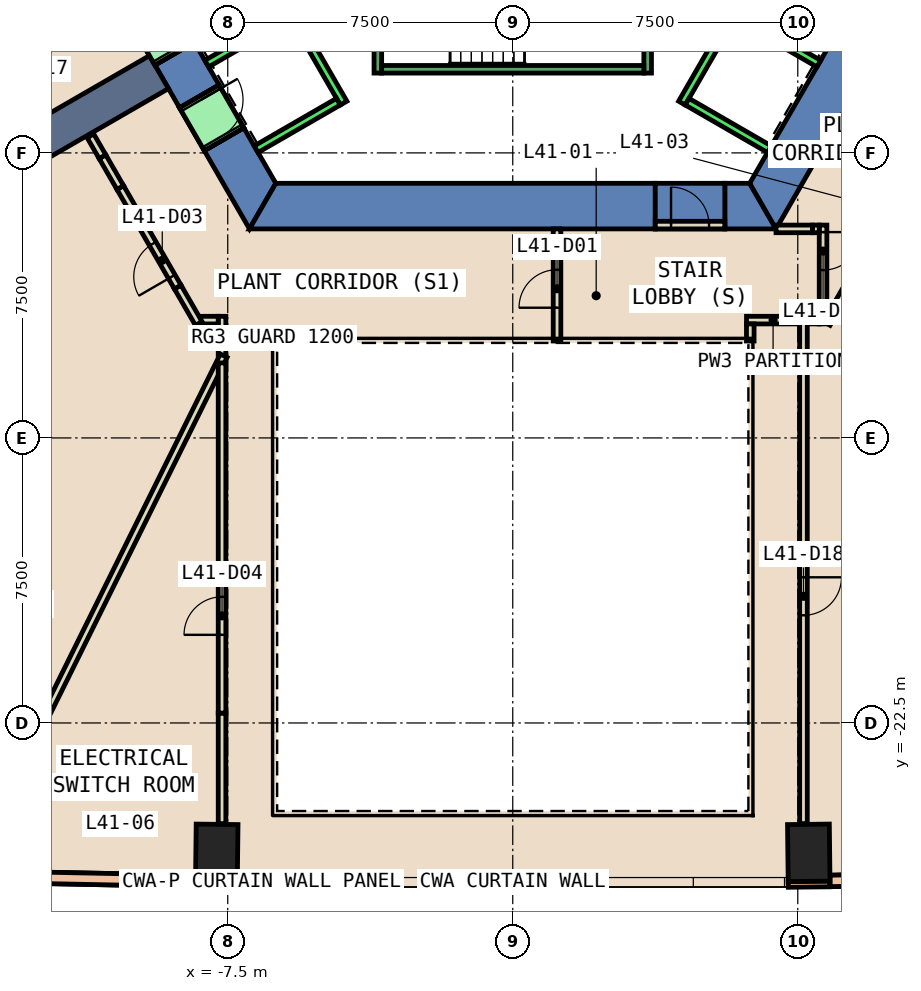
"""IFC4 building model, lengths in metres.
Left out: names, types, materials, properties, quantities, classifications, styles, units other than length and angle.
Written with IfcOpenShell. Run it as: python <this file> out.ifc"""

import sys

from ifc_helpers import new_model, si_unit, direction, frame, frame_2d, origin, origin_2d, place, context, subcontext, project, spatial, polyline, rectangle, outline, extrude, element, fill, save


model = new_model("IFC4")
c1 = context("Model", 3, precision=1e-05, world=origin(), true_north=direction((0.0, 1.0)))
c2 = subcontext(c1, "Body", "Model", "MODEL_VIEW")
j1 = project(units=[si_unit("LENGTHUNIT", "METRE"), si_unit("PLANEANGLEUNIT", "RADIAN")], contexts=[c1])
p1 = place(None, origin())
s1 = spatial("IfcSite", under=j1, at=p1, CompositionType="ELEMENT")
p2 = place(p1, origin())
s2 = spatial("IfcBuilding", under=s1, at=p2, CompositionType="ELEMENT")
p3 = place(p2, frame((0.0, 0.0, 184.4)))
s3 = spatial("IfcBuildingStorey", under=s2, at=p3, CompositionType="ELEMENT", Elevation=184.4)
for number, where, z_axis, x_axis in (
    (1, (-7.789, -25.917, -0.6), (0.0, 0.0, 1.0), (-1.0, 0.012, 0.0)),
    (2, (7.789, -25.917, -0.6), (0.0, 0.0, 1.0), (1.0, 0.012, 0.0)),
):
    element("IfcColumn", number, at=place(p3, frame(where, z_axis=z_axis, x_axis=x_axis)), inside=s3, PredefinedType="COLUMN", context=c2, shape_type="SweptSolid", body=[
        extrude(rectangle(XDim=1.1, YDim=1.5, at=origin_2d()), origin(), (0.0, 0.0, 1.0), 5.4),
    ])
p4 = place(p3, frame((0.0, 0.0, -0.6)))
e3 = element("IfcWall", 3, at=p4, inside=s3, PredefinedType="SHEAR", context=c2, shape_type="SweptSolid", body=[
    extrude(outline(polyline([(-8.767, -6.314), (-7.728, -5.714), (-8.378, -4.589), (-9.417, -5.189), (-8.767, -6.314)])), origin(), (0.0, 0.0, 1.0), 5.4),
])
p5 = place(p3, frame((0.0, 0.0, -0.6)))
e4 = element("IfcWall", 4, at=p5, inside=s3, PredefinedType="SHEAR", context=c2, shape_type="SweptSolid", body=[
    extrude(outline(polyline([(-7.078, -6.84), (-8.117, -7.44), (-6.928, -9.5), (-6.235, -8.3), (-7.078, -6.84)])), origin(), (0.0, 0.0, 1.0), 5.4),
])
p6 = place(p3, frame((0.0, 0.0, 3.6)))
e5 = element("IfcWall", 5, at=p6, inside=s3, PredefinedType="SHEAR", context=c2, shape_type="SweptSolid", body=[
    extrude(outline(polyline([(-9.417, -5.189), (-8.378, -4.589), (-9.028, -3.463), (-10.067, -4.063), (-9.417, -5.189)])), origin(), (0.0, 0.0, 1.0), 1.2),
])
p7 = place(p3, frame((0.0, 0.0, 3.6)))
e6 = element("IfcWall", 6, at=p7, inside=s3, PredefinedType="SHEAR", context=c2, shape_type="SweptSolid", body=[
    extrude(outline(polyline([(-8.117, -7.44), (-7.078, -6.84), (-7.728, -5.714), (-8.767, -6.314), (-8.117, -7.44)])), origin(), (0.0, 0.0, 1.0), 1.2),
])
p8 = place(p3, frame((0.0, 0.0, -0.6)))
e7 = element("IfcWall", 7, at=p8, inside=s3, PredefinedType="SHEAR", context=c2, shape_type="SweptSolid", body=[
    extrude(outline(polyline([(3.75, -9.5), (3.75, -8.3), (-6.235, -8.3), (-6.928, -9.5), (3.75, -9.5)])), origin(), (0.0, 0.0, 1.0), 5.4),
])
p9 = place(p3, frame((0.0, 0.0, -0.6)))
e8 = element("IfcWall", 8, at=p9, inside=s3, PredefinedType="SHEAR", context=c2, shape_type="SweptSolid", body=[
    extrude(outline(polyline([(5.58, -8.3), (5.58, -9.5), (6.928, -9.5), (6.235, -8.3), (5.58, -8.3)])), origin(), (0.0, 0.0, 1.0), 5.4),
])
p10 = place(p3, frame((0.0, 0.0, 3.6)))
e9 = element("IfcWall", 9, at=p10, inside=s3, PredefinedType="SHEAR", context=c2, shape_type="SweptSolid", body=[
    extrude(outline(polyline([(5.58, -9.5), (5.58, -8.3), (3.75, -8.3), (3.75, -9.5), (5.58, -9.5)])), origin(), (0.0, 0.0, 1.0), 1.2),
])
p11 = place(p3, frame((0.0, 0.0, -0.6)))
e10 = element("IfcWall", 10, at=p11, inside=s3, PredefinedType="SHEAR", context=c2, shape_type="SweptSolid", body=[
    extrude(outline(polyline([(6.928, -9.5), (13.856, 2.5), (12.471, 2.5), (6.235, -8.3), (6.928, -9.5)])), origin(), (0.0, 0.0, 1.0), 5.4),
])
p12 = place(p3, frame((-9.31, -5.375, 0.0), z_axis=(0.0, 0.0, 1.0), x_axis=(-0.866015103238, -0.500017840646, 0.0)))
e11 = element("IfcWall", 11, at=p12, inside=s3, PredefinedType="SHEAR", context=c2, shape_type="SweptSolid", body=[
    extrude(rectangle(XDim=27.139, YDim=1.0, at=frame_2d((13.57, 0.0))), origin(), (0.0, 0.0, 1.0), 4.8),
])
for number, where, z_axis, x_axis in (
    (12, (-8.349, -26.736, 0.0), (0.0, 0.0, 1.0), (1.0, -0.011, 0.0)),
    (13, (7.249, -26.748, 0.0), (0.0, 0.0, 1.0), (1.0, 0.011, 0.0)),
):
    element("IfcWall", number, at=place(p3, frame(where, z_axis=z_axis, x_axis=x_axis)), inside=s3, PredefinedType="STANDARD", context=c2, shape_type="SweptSolid", body=[
        extrude(rectangle(XDim=1.1, YDim=0.15, at=frame_2d((0.55, 0.0))), origin(), (0.0, 0.0, 1.0), 4.8),
    ])
p13 = place(p3, frame((-15.68, -26.508, 0.0), z_axis=(0.0, 0.0, 1.0), x_axis=(0.999796530884, -0.020171683903, 0.0)))
e14 = element("IfcWall", 14, at=p13, inside=s3, PredefinedType="STANDARD", context=c2, shape_type="SweptSolid", body=[
    extrude(rectangle(XDim=7.334, YDim=0.3, at=frame_2d((3.667, 0.0))), origin(), (0.0, 0.0, 1.0), 1.2),
])
p14 = place(p3, frame((-15.68, -26.508, 4.0), z_axis=(0.0, 0.0, 1.0), x_axis=(0.999796530884, -0.020171683903, 0.0)))
e15 = element("IfcWall", 15, at=p14, inside=s3, PredefinedType="STANDARD", context=c2, shape_type="SweptSolid", body=[
    extrude(rectangle(XDim=7.334, YDim=0.3, at=frame_2d((3.667, 0.0))), origin(), (0.0, 0.0, 1.0), 0.8),
])
p15 = place(p3, frame((8.347, -26.656, 0.0), z_axis=(0.0, 0.0, 1.0), x_axis=(0.999796530884, 0.020171683903, 0.0)))
e16 = element("IfcWall", 16, at=p15, inside=s3, PredefinedType="STANDARD", context=c2, shape_type="SweptSolid", body=[
    extrude(rectangle(XDim=7.334, YDim=0.3, at=frame_2d((3.667, 0.0))), origin(), (0.0, 0.0, 1.0), 1.2),
])
p16 = place(p3, frame((8.347, -26.656, 4.0), z_axis=(0.0, 0.0, 1.0), x_axis=(0.999796530884, 0.020171683903, 0.0)))
e17 = element("IfcWall", 17, at=p16, inside=s3, PredefinedType="STANDARD", context=c2, shape_type="SweptSolid", body=[
    extrude(rectangle(XDim=7.334, YDim=0.3, at=frame_2d((3.667, 0.0))), origin(), (0.0, 0.0, 1.0), 0.8),
])
p17 = place(p3, frame((1.165, -12.45, 0.0), z_axis=(0.0, 0.0, 1.0), x_axis=(0.0, 1.0, 0.0)))
e18 = element("IfcWall", 18, at=p17, inside=s3, PredefinedType="PARTITIONING", context=c2, shape_type="SweptSolid", body=[
    extrude(rectangle(XDim=2.95, YDim=0.2, at=frame_2d((1.475, 0.0))), origin(), (0.0, 0.0, 1.0), 4.8),
])
p18 = place(p17, frame((0.876, 0.0, 0.0)))
e19 = element("IfcOpeningElement", 19, at=p18, cuts=e18, PredefinedType="OPENING", context=c2, shape_type="SweptSolid", body=[
    extrude(rectangle(XDim=1.0, YDim=2.1, at=frame_2d((0.5, 1.05))), frame((0.0, 0.11, 0.0), z_axis=(0.0, -1.0, 0.0), x_axis=(1.0, 0.0, 0.0)), (0.0, 0.0, 1.0), 0.22),
])
p19 = place(p3, frame((7.55, -11.9, 0.0), z_axis=(0.0, 0.0, 1.0), x_axis=(-1.0, 0.0, 0.0)))
e20 = element("IfcWall", 20, at=p19, inside=s3, PredefinedType="PARTITIONING", context=c2, shape_type="SweptSolid", body=[
    extrude(rectangle(XDim=1.399, YDim=0.2, at=frame_2d((0.7, 0.0))), origin(), (0.0, 0.0, 1.0), 4.8),
])
p20 = place(p3, frame((6.25, -12.0, 0.0), z_axis=(0.0, 0.0, 1.0), x_axis=(0.0, -1.0, 0.0)))
e21 = element("IfcWall", 21, at=p20, inside=s3, PredefinedType="PARTITIONING", context=c2, shape_type="SweptSolid", body=[
    extrude(rectangle(XDim=0.45, YDim=0.2, at=frame_2d((0.225, 0.0))), origin(), (0.0, 0.0, 1.0), 4.8),
])
p21 = place(p3, frame((6.928, -9.5, 0.0), z_axis=(0.0, 0.0, 1.0), x_axis=(1.0, 0.0, 0.0)))
e22 = element("IfcWall", 22, at=p21, inside=s3, PredefinedType="PARTITIONING", context=c2, shape_type="SweptSolid", body=[
    extrude(rectangle(XDim=0.962, YDim=0.2, at=frame_2d((0.481, 0.0))), origin(), (0.0, 0.0, 1.0), 2.4),
])
p22 = place(p3, frame((8.165, -9.4, 0.0), z_axis=(0.0, 0.0, 1.0), x_axis=(0.0, -1.0, 0.0)))
e23 = element("IfcWall", 23, at=p22, inside=s3, PredefinedType="PARTITIONING", context=c2, shape_type="SweptSolid", body=[
    extrude(rectangle(XDim=2.6, YDim=0.2, at=frame_2d((1.3, 0.0))), origin(), (0.0, 0.0, 1.0), 4.8),
])
p23 = place(p22, frame((0.184, 0.0, 0.0)))
e24 = element("IfcOpeningElement", 24, at=p23, cuts=e23, PredefinedType="OPENING", context=c2, shape_type="SweptSolid", body=[
    extrude(rectangle(XDim=1.0, YDim=2.1, at=frame_2d((0.5, 1.05))), frame((0.0, 0.11, 0.0), z_axis=(0.0, -1.0, 0.0), x_axis=(1.0, 0.0, 0.0)), (0.0, 0.0, 1.0), 0.22),
])
p24 = place(p3, frame((8.065, -11.9, 0.0), z_axis=(0.0, 0.0, 1.0), x_axis=(-1.0, 0.0, 0.0)))
e25 = element("IfcWall", 25, at=p24, inside=s3, PredefinedType="PARTITIONING", context=c2, shape_type="SweptSolid", body=[
    extrude(rectangle(XDim=0.315, YDim=0.2, at=frame_2d((0.157, 0.0))), origin(), (0.0, 0.0, 1.0), 4.8),
])
p25 = place(p3, frame((7.65, -11.8, 0.0), z_axis=(0.0, 0.0, 1.0), x_axis=(0.0, -1.0, 0.0)))
e26 = element("IfcWall", 26, at=p25, inside=s3, PredefinedType="PARTITIONING", context=c2, shape_type="SweptSolid", body=[
    extrude(rectangle(XDim=13.349, YDim=0.2, at=frame_2d((6.674, 0.0))), origin(), (0.0, 0.0, 1.0), 4.8),
])
p26 = place(p25, frame((6.867, 0.0, 0.0)))
e27 = element("IfcOpeningElement", 27, at=p26, cuts=e26, PredefinedType="OPENING", context=c2, shape_type="SweptSolid", body=[
    extrude(rectangle(XDim=1.0, YDim=2.1, at=frame_2d((0.5, 1.05))), frame((0.0, 0.11, 0.0), z_axis=(0.0, -1.0, 0.0), x_axis=(1.0, 0.0, 0.0)), (0.0, 0.0, 1.0), 0.22),
])
p27 = place(p3, frame((-7.65, -12.826, 0.0), z_axis=(0.0, 0.0, 1.0), x_axis=(0.0, 1.0, 0.0)))
e28 = element("IfcWall", 28, at=p27, inside=s3, PredefinedType="PARTITIONING", context=c2, shape_type="SweptSolid", body=[
    extrude(rectangle(XDim=1.026, YDim=0.2, at=frame_2d((0.513, 0.0))), origin(), (0.0, 0.0, 1.0), 4.8),
])
p28 = place(p3, frame((-7.75, -11.9, 0.0), z_axis=(0.0, 0.0, 1.0), x_axis=(-1.0, 0.0, 0.0)))
e29 = element("IfcWall", 29, at=p28, inside=s3, PredefinedType="PARTITIONING", context=c2, shape_type="SweptSolid", body=[
    extrude(rectangle(XDim=0.464, YDim=0.2, at=frame_2d((0.232, 0.0))), origin(), (0.0, 0.0, 1.0), 2.4),
])
p29 = place(p3, frame((-8.264, -11.987, 0.0), z_axis=(0.0, 0.0, 1.0), x_axis=(-0.499633176362, 0.866237085952, 0.0)))
e30 = element("IfcWall", 30, at=p29, inside=s3, PredefinedType="PARTITIONING", context=c2, shape_type="SweptSolid", body=[
    extrude(rectangle(XDim=1.105, YDim=0.2, at=frame_2d((0.552, 0.0))), origin(), (0.0, 0.0, 1.0), 2.4),
])
p30 = place(p3, frame((-7.65, -25.149, 0.0), z_axis=(0.0, 0.0, 1.0), x_axis=(0.0, 1.0, 0.0)))
e31 = element("IfcWall", 31, at=p30, inside=s3, PredefinedType="PARTITIONING", context=c2, shape_type="SweptSolid", body=[
    extrude(rectangle(XDim=2.909, YDim=0.2, at=frame_2d((1.455, 0.0))), origin(), (0.0, 0.0, 1.0), 4.8),
])
p31 = place(p3, frame((-7.606, -12.836, 0.0), z_axis=(0.0, 0.0, 1.0), x_axis=(-0.444256696047, -0.895899541253, 0.0)))
e32 = element("IfcWall", 32, at=p31, inside=s3, PredefinedType="PARTITIONING", context=c2, shape_type="SweptSolid", body=[
    extrude(rectangle(XDim=13.916, YDim=0.2, at=frame_2d((6.958, 0.0))), origin(), (0.0, 0.0, 1.0), 4.8),
])
p32 = place(p3, frame((-35.502, -17.996, 0.0), z_axis=(0.0, 0.0, 1.0), x_axis=(0.866041720547, 0.499971737474, 0.0)))
e33 = element("IfcWall", 33, at=p32, inside=s3, PredefinedType="PARTITIONING", context=c2, shape_type="SweptSolid", body=[
    extrude(rectangle(XDim=28.994, YDim=0.2, at=frame_2d((14.497, 0.0))), origin(), (0.0, 0.0, 1.0), 4.8),
])
p33 = place(p3, frame((3.75, -9.4, 0.0), z_axis=(0.0, 0.0, 1.0), x_axis=(1.0, 0.0, 0.0)))
e34 = element("IfcWall", 34, at=p33, inside=s3, PredefinedType="PARTITIONING", context=c2, shape_type="SweptSolid", body=[
    extrude(rectangle(XDim=1.83, YDim=0.2, at=frame_2d((0.915, 0.0))), origin(), (0.0, 0.0, 1.0), 2.4),
])
p34 = place(p33, frame((0.415, 0.0, 0.0)))
e35 = element("IfcOpeningElement", 35, at=p34, cuts=e34, PredefinedType="OPENING", context=c2, shape_type="SweptSolid", body=[
    extrude(rectangle(XDim=1.0, YDim=2.1, at=frame_2d((0.5, 1.05))), frame((0.0, 0.11, 0.0), z_axis=(0.0, -1.0, 0.0), x_axis=(1.0, 0.0, 0.0)), (0.0, 0.0, 1.0), 0.22),
])
p35 = place(p3, frame((7.89, -9.5, 0.0), z_axis=(0.0, 0.0, 1.0), x_axis=(1.0, 0.0, 0.0)))
e36 = element("IfcWall", 36, at=p35, inside=s3, PredefinedType="PARTITIONING", context=c2, shape_type="SweptSolid", body=[
    extrude(rectangle(XDim=0.175, YDim=0.2, at=frame_2d((0.087, 0.0))), origin(), (0.0, 0.0, 1.0), 4.8),
])
p36 = place(p3, frame((-8.816, -11.03, 0.0), z_axis=(0.0, 0.0, 1.0), x_axis=(-0.50004869401, 0.865997288459, 0.0)))
e37 = element("IfcWall", 37, at=p36, inside=s3, PredefinedType="PARTITIONING", context=c2, shape_type="SweptSolid", body=[
    extrude(rectangle(XDim=2.008, YDim=0.2, at=frame_2d((1.004, 0.0))), origin(), (0.0, 0.0, 1.0), 4.8),
])
p37 = place(p36, frame((0.314, 0.0, 0.0)))
e38 = element("IfcOpeningElement", 38, at=p37, cuts=e37, PredefinedType="OPENING", context=c2, shape_type="SweptSolid", body=[
    extrude(rectangle(XDim=1.0, YDim=2.1, at=frame_2d((0.5, 1.05))), frame((0.0, 0.11, 0.0), z_axis=(0.0, -1.0, 0.0), x_axis=(1.0, 0.0, 0.0)), (0.0, 0.0, 1.0), 0.22),
])
p38 = place(p3, frame((-9.82, -9.291, 0.0), z_axis=(0.0, 0.0, 1.0), x_axis=(-0.500277597875, 0.865865073245, 0.0)))
e39 = element("IfcWall", 39, at=p38, inside=s3, PredefinedType="PARTITIONING", context=c2, shape_type="SweptSolid", body=[
    extrude(rectangle(XDim=1.015, YDim=0.2, at=frame_2d((0.508, 0.0))), origin(), (0.0, 0.0, 1.0), 2.4),
])
p39 = place(p3, frame((-10.328, -8.412, 0.0), z_axis=(0.0, 0.0, 1.0), x_axis=(-0.4998875608, 0.866090310855, 0.0)))
e40 = element("IfcWall", 40, at=p39, inside=s3, PredefinedType="PARTITIONING", context=c2, shape_type="SweptSolid", body=[
    extrude(rectangle(XDim=0.939, YDim=0.2, at=frame_2d((0.469, 0.0))), origin(), (0.0, 0.0, 1.0), 4.8),
])
p40 = place(p3, frame((-10.797, -7.599, 0.0), z_axis=(0.0, 0.0, 1.0), x_axis=(-0.499377186864, 0.866384686638, 0.0)))
e41 = element("IfcWall", 41, at=p40, inside=s3, PredefinedType="PARTITIONING", context=c2, shape_type="SweptSolid", body=[
    extrude(rectangle(XDim=0.633, YDim=0.2, at=frame_2d((0.316, 0.0))), origin(), (0.0, 0.0, 1.0), 2.4),
])
p41 = place(p3, frame((-7.65, -22.24, 0.0), z_axis=(0.0, 0.0, 1.0), x_axis=(0.0, 1.0, 0.0)))
e42 = element("IfcWall", 42, at=p41, inside=s3, PredefinedType="PARTITIONING", context=c2, shape_type="SweptSolid", body=[
    extrude(rectangle(XDim=3.455, YDim=0.2, at=frame_2d((1.728, 0.0))), origin(), (0.0, 0.0, 1.0), 2.4),
])
p42 = place(p41, frame((2.059, 0.0, 0.0)))
e43 = element("IfcOpeningElement", 43, at=p42, cuts=e42, PredefinedType="OPENING", context=c2, shape_type="SweptSolid", body=[
    extrude(rectangle(XDim=1.0, YDim=2.1, at=frame_2d((0.5, 1.05))), frame((0.0, 0.11, 0.0), z_axis=(0.0, -1.0, 0.0), x_axis=(1.0, 0.0, 0.0)), (0.0, 0.0, 1.0), 0.22),
])
p43 = place(p3, frame((-7.65, -18.785, 0.0), z_axis=(0.0, 0.0, 1.0), x_axis=(0.0, 1.0, 0.0)))
e44 = element("IfcWall", 44, at=p43, inside=s3, PredefinedType="PARTITIONING", context=c2, shape_type="SweptSolid", body=[
    extrude(rectangle(XDim=5.759, YDim=0.2, at=frame_2d((2.879, 0.0))), origin(), (0.0, 0.0, 1.0), 4.8),
])
p44 = place(p3, frame((8.816, -11.03, 0.0), z_axis=(0.0, 0.0, 1.0), x_axis=(-0.499633176362, -0.866237085952, 0.0)))
e45 = element("IfcWall", 45, at=p44, inside=s3, PredefinedType="PARTITIONING", context=c2, shape_type="SweptSolid", body=[
    extrude(rectangle(XDim=1.105, YDim=0.2, at=frame_2d((0.552, 0.0))), origin(), (0.0, 0.0, 1.0), 2.4),
])
p45 = place(p3, frame((-9.751, 2.99, 0.0), z_axis=(0.0, 0.0, 1.0), x_axis=(0.50000090737, -0.866024879913, 0.0)))
e46 = element("IfcWall", 46, at=p45, inside=s3, PredefinedType="STANDARD", context=c2, shape_type="SweptSolid", body=[
    extrude(rectangle(XDim=10.6, YDim=0.2, at=frame_2d((5.3, 0.0))), origin(), (0.0, 0.0, 1.0), 4.8),
])
for number, where, z_axis, x_axis in (
    (47, (-5.888, -3.902, 0.0), (0.0, 0.0, 1.0), (-0.866, -0.5, 0.0)),
    (48, (-4.588, -6.153, 0.0), (0.0, 0.0, 1.0), (-0.866, -0.5, 0.0)),
):
    element("IfcWall", number, at=place(p3, frame(where, z_axis=z_axis, x_axis=x_axis)), inside=s3, PredefinedType="STANDARD", context=c2, shape_type="SweptSolid", body=[
        extrude(rectangle(XDim=2.5, YDim=0.2, at=frame_2d((1.25, 0.0))), origin(), (0.0, 0.0, 1.0), 4.8),
    ])
p46 = place(p3, frame((4.451, -6.19, 0.0), z_axis=(0.0, 0.0, 1.0), x_axis=(0.50000090737, 0.866024879913, 0.0)))
e49 = element("IfcWall", 49, at=p46, inside=s3, PredefinedType="STANDARD", context=c2, shape_type="SweptSolid", body=[
    extrude(rectangle(XDim=10.6, YDim=0.2, at=frame_2d((5.3, 0.0))), origin(), (0.0, 0.0, 1.0), 4.8),
])
for number, where, z_axis, x_axis in (
    (50, (4.588, -6.153, 0.0), (0.0, 0.0, 1.0), (0.866, -0.5, 0.0)),
    (51, (5.888, -3.902, 0.0), (0.0, 0.0, 1.0), (0.866, -0.5, 0.0)),
):
    element("IfcWall", number, at=place(p3, frame(where, z_axis=z_axis, x_axis=x_axis)), inside=s3, PredefinedType="STANDARD", context=c2, shape_type="SweptSolid", body=[
        extrude(rectangle(XDim=2.5, YDim=0.2, at=frame_2d((1.25, 0.0))), origin(), (0.0, 0.0, 1.0), 4.8),
    ])
p47 = place(p3, frame((-9.548, -3.763, 0.0), z_axis=(0.0, 0.0, 1.0), x_axis=(0.500036693733, -0.866004217611, 0.0)))
e52 = element("IfcWall", 52, at=p47, inside=s3, PredefinedType="STANDARD", context=c2, shape_type="SweptSolid", body=[
    extrude(rectangle(XDim=1.3, YDim=1.2, at=frame_2d((0.65, 0.0))), origin(), (0.0, 0.0, 1.0), 2.4),
])
p48 = place(p47, frame((0.1, 0.0, 0.0)))
e53 = element("IfcOpeningElement", 53, at=p48, cuts=e52, PredefinedType="OPENING", context=c2, shape_type="SweptSolid", body=[
    extrude(rectangle(XDim=1.1, YDim=2.3, at=frame_2d((0.55, 1.15))), frame((0.0, 0.61, 0.0), z_axis=(0.0, -1.0, 0.0), x_axis=(1.0, 0.0, 0.0)), (0.0, 0.0, 1.0), 1.22),
])
p49 = place(p3, frame((-8.248, -6.015, 0.0), z_axis=(0.0, 0.0, 1.0), x_axis=(0.500362116554, -0.865816234728, 0.0)))
e54 = element("IfcWall", 54, at=p49, inside=s3, PredefinedType="STANDARD", context=c2, shape_type="SweptSolid", body=[
    extrude(rectangle(XDim=1.299, YDim=1.2, at=frame_2d((0.65, 0.0))), origin(), (0.0, 0.0, 1.0), 2.4),
])
p50 = place(p49, frame((0.1, 0.0, 0.0)))
e55 = element("IfcOpeningElement", 55, at=p50, cuts=e54, PredefinedType="OPENING", context=c2, shape_type="SweptSolid", body=[
    extrude(rectangle(XDim=1.1, YDim=2.3, at=frame_2d((0.55, 1.15))), frame((0.0, 0.61, 0.0), z_axis=(0.0, -1.0, 0.0), x_axis=(1.0, 0.0, 0.0)), (0.0, 0.0, 1.0), 1.22),
])
p51 = place(p3, frame((-3.55, -1.0, 0.0), z_axis=(0.0, 0.0, 1.0), x_axis=(0.0, -1.0, 0.0)))
e56 = element("IfcWall", 56, at=p51, inside=s3, PredefinedType="STANDARD", context=c2, shape_type="SweptSolid", body=[
    extrude(rectangle(XDim=4.4, YDim=0.2, at=frame_2d((2.2, 0.0))), origin(), (0.0, 0.0, 1.0), 4.8),
])
p52 = place(p51, frame((2.4, 0.0, 0.0)))
e57 = element("IfcOpeningElement", 57, at=p52, cuts=e56, PredefinedType="OPENING", context=c2, shape_type="SweptSolid", body=[
    extrude(rectangle(XDim=1.1, YDim=2.2, at=frame_2d((0.55, 1.1))), frame((0.0, 0.11, 0.0), z_axis=(0.0, -1.0, 0.0), x_axis=(1.0, 0.0, 0.0)), (0.0, 0.0, 1.0), 0.22),
])
p53 = place(p3, frame((3.55, -2.667, 0.0), z_axis=(0.0, 0.0, 1.0), x_axis=(0.0, -1.0, 0.0)))
e58 = element("IfcWall", 58, at=p53, inside=s3, PredefinedType="STANDARD", context=c2, shape_type="SweptSolid", body=[
    extrude(rectangle(XDim=2.733, YDim=0.2, at=frame_2d((1.366, 0.0))), origin(), (0.0, 0.0, 1.0), 4.8),
])
p54 = place(p3, frame((-3.45, -5.3, 0.0), z_axis=(0.0, 0.0, 1.0), x_axis=(1.0, 0.0, 0.0)))
e59 = element("IfcWall", 59, at=p54, inside=s3, PredefinedType="STANDARD", context=c2, shape_type="SweptSolid", body=[
    extrude(rectangle(XDim=6.9, YDim=0.2, at=frame_2d((3.45, 0.0))), origin(), (0.0, 0.0, 1.0), 4.8),
])
p55 = place(p18, origin())
e60 = element("IfcDoor", 60, at=p55, inside=s3, OperationType="SINGLE_SWING_LEFT", PredefinedType="DOOR", context=c2, shape_type="SweptSolid", body=[
    extrude(rectangle(XDim=1.0, YDim=2.1, at=frame_2d((0.5, 1.05))), frame((0.0, 0.025, 0.0), z_axis=(0.0, -1.0, 0.0), x_axis=(1.0, 0.0, 0.0)), (0.0, 0.0, 1.0), 0.05),
])
fill(e19, e60)
p56 = place(p23, origin())
e61 = element("IfcDoor", 61, at=p56, inside=s3, OperationType="SINGLE_SWING_RIGHT", PredefinedType="DOOR", context=c2, shape_type="SweptSolid", body=[
    extrude(rectangle(XDim=1.0, YDim=2.1, at=frame_2d((0.5, 1.05))), frame((0.0, 0.025, 0.0), z_axis=(0.0, -1.0, 0.0), x_axis=(1.0, 0.0, 0.0)), (0.0, 0.0, 1.0), 0.05),
])
fill(e24, e61)
p57 = place(p37, origin())
e62 = element("IfcDoor", 62, at=p57, inside=s3, OperationType="SINGLE_SWING_LEFT", PredefinedType="DOOR", context=c2, shape_type="SweptSolid", body=[
    extrude(rectangle(XDim=1.0, YDim=2.1, at=frame_2d((0.5, 1.05))), frame((0.0, 0.025, 0.0), z_axis=(0.0, -1.0, 0.0), x_axis=(1.0, 0.0, 0.0)), (0.0, 0.0, 1.0), 0.05),
])
fill(e38, e62)
p58 = place(p42, origin())
e63 = element("IfcDoor", 63, at=p58, inside=s3, OperationType="SINGLE_SWING_RIGHT", PredefinedType="DOOR", context=c2, shape_type="SweptSolid", body=[
    extrude(rectangle(XDim=1.0, YDim=2.1, at=frame_2d((0.5, 1.05))), frame((0.0, 0.025, 0.0), z_axis=(0.0, -1.0, 0.0), x_axis=(1.0, 0.0, 0.0)), (0.0, 0.0, 1.0), 0.05),
])
fill(e43, e63)
p59 = place(p26, origin())
e64 = element("IfcDoor", 64, at=p59, inside=s3, OperationType="SINGLE_SWING_RIGHT", PredefinedType="DOOR", context=c2, shape_type="SweptSolid", body=[
    extrude(rectangle(XDim=1.0, YDim=2.1, at=frame_2d((0.5, 1.05))), frame((0.0, 0.025, 0.0), z_axis=(0.0, -1.0, 0.0), x_axis=(1.0, 0.0, 0.0)), (0.0, 0.0, 1.0), 0.05),
])
fill(e27, e64)
p60 = place(p34, origin())
e65 = element("IfcDoor", 65, at=p60, inside=s3, OperationType="SINGLE_SWING_LEFT", PredefinedType="DOOR", context=c2, shape_type="SweptSolid", body=[
    extrude(rectangle(XDim=1.0, YDim=2.1, at=frame_2d((0.5, 1.05))), frame((0.0, 0.025, 0.0), z_axis=(0.0, -1.0, 0.0), x_axis=(1.0, 0.0, 0.0)), (0.0, 0.0, 1.0), 0.05),
])
fill(e35, e65)
p61 = place(p50, origin())
e66 = element("IfcDoor", 66, at=p61, inside=s3, OperationType="SLIDING_TO_LEFT", PredefinedType="DOOR", context=c2, shape_type="SweptSolid", body=[
    extrude(rectangle(XDim=1.1, YDim=2.3, at=frame_2d((0.55, 1.15))), frame((0.0, 0.025, 0.0), z_axis=(0.0, -1.0, 0.0), x_axis=(1.0, 0.0, 0.0)), (0.0, 0.0, 1.0), 0.05),
])
fill(e55, e66)
save(model, sys.argv[1])
